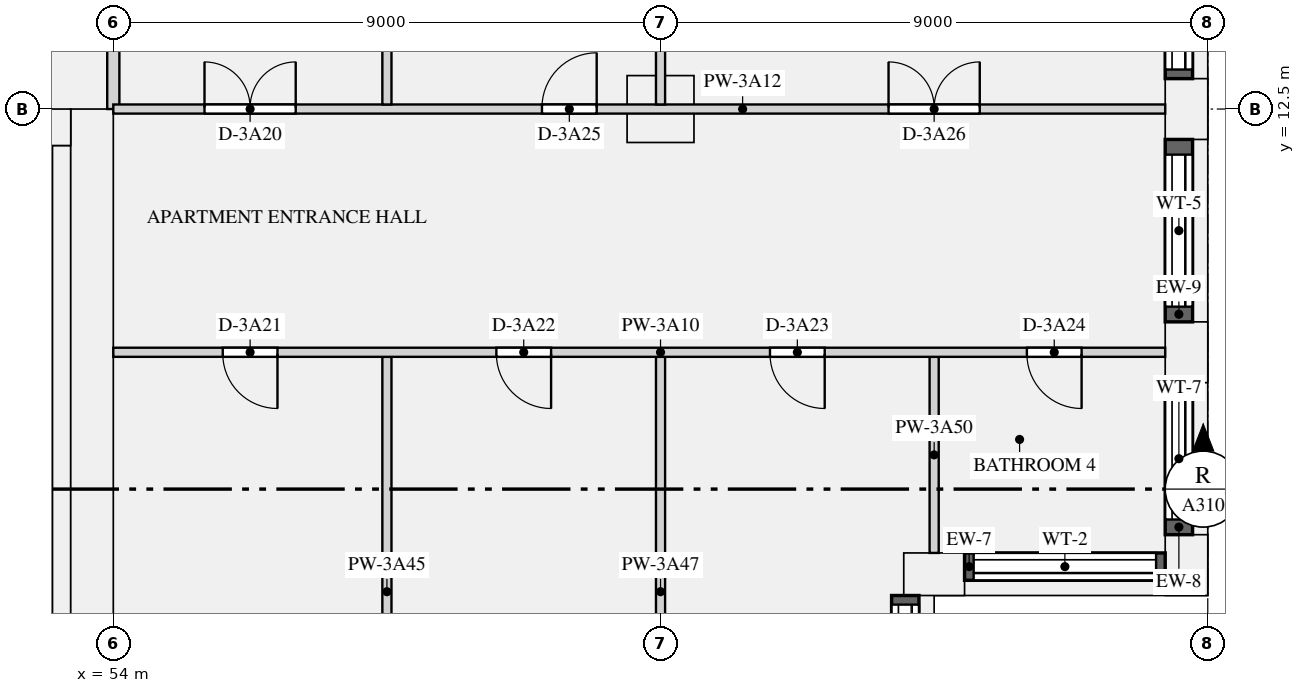
"""IFC4 building model, lengths in metres.
Left out: names, types, materials, properties, quantities, classifications, styles, units other than length and angle.
Written with IfcOpenShell. Run it as: python <this file> out.ifc"""

import sys

from ifc_helpers import new_model, si_unit, direction, frame, frame_2d, origin, origin_2d, place, context, subcontext, project, spatial, rectangle, extrude, element, fill, save


model = new_model("IFC4")
c1 = context("Model", 3, precision=1e-05, world=origin(), true_north=direction((0.0, 1.0)))
c2 = subcontext(c1, "Body", "Model", "MODEL_VIEW")
j1 = project(units=[si_unit("LENGTHUNIT", "METRE"), si_unit("PLANEANGLEUNIT", "RADIAN")], contexts=[c1])
p1 = place(None, origin())
s1 = spatial("IfcSite", under=j1, at=p1, CompositionType="ELEMENT")
p2 = place(p1, origin())
s2 = spatial("IfcBuilding", under=s1, at=p2, CompositionType="ELEMENT")
p3 = place(p2, frame((0.0, 0.0, 144.45)))
s3 = spatial("IfcBuildingStorey", under=s2, at=p3, CompositionType="ELEMENT", Elevation=144.45)
for number, where, z_axis, x_axis in (
    (1, (67.5, 4.85, 0.0), (0.0, 0.0, 1.0), (1.0, 0.0, 0.0)),
    (2, (71.65, 5.0, 0.0), (0.0, 0.0, 1.0), (0.0, 1.0, 0.0)),
    (3, (71.65, 8.5, 0.0), (0.0, 0.0, 1.0), (0.0, 1.0, 0.0)),
    (4, (71.65, 12.5, 0.0), (0.0, 0.0, 1.0), (0.0, 1.0, 0.0)),
):
    element("IfcColumn", number, at=place(p3, frame(where, z_axis=z_axis, x_axis=x_axis)), inside=s3, PredefinedType="USERDEFINED", context=c2, shape_type="SweptSolid", body=[
        extrude(rectangle(XDim=1.0, YDim=0.7, at=origin_2d()), origin(), (0.0, 0.0, 1.0), 3.15),
    ])
p4 = place(p3, frame((63.0, 12.5, 0.0), z_axis=(0.0, 0.0, 1.0), x_axis=(1.0, 0.0, 0.0)))
e5 = element("IfcColumn", 5, at=p4, inside=s3, PredefinedType="COLUMN", context=c2, shape_type="SweptSolid", body=[
    extrude(rectangle(XDim=1.1, YDim=1.1, at=origin_2d()), origin(), (0.0, 0.0, 1.0), 3.15),
])
p5 = place(p3, frame((53.65, 0.0, 0.0), z_axis=(0.0, 0.0, 1.0), x_axis=(0.0, 1.0, 0.0)))
e6 = element("IfcWall", 6, at=p5, inside=s3, PredefinedType="SHEAR", context=c2, shape_type="SweptSolid", body=[
    extrude(rectangle(XDim=12.5, YDim=0.7, at=frame_2d((6.25, 0.0))), origin(), (0.0, 0.0, 1.0), 3.15),
])
p6 = place(p3, frame((18.7, 12.2, 0.0), z_axis=(0.0, 0.0, 1.0), x_axis=(1.0, 0.0, 0.0)))
e7 = element("IfcWall", 7, at=p6, inside=s3, PredefinedType="SHEAR", context=c2, shape_type="SweptSolid", body=[
    extrude(rectangle(XDim=34.6, YDim=0.6, at=frame_2d((17.3, 0.0))), origin(), (0.0, 0.0, 1.0), 3.15),
])
p7 = place(p6, frame((24.475, 0.0, 0.0)))
e8 = element("IfcOpeningElement", 8, at=p7, cuts=e7, PredefinedType="OPENING", context=c2, shape_type="SweptSolid", body=[
    extrude(rectangle(XDim=1.1, YDim=2.1, at=frame_2d((0.55, 1.05))), frame((0.0, 0.31, 0.0), z_axis=(0.0, -1.0, 0.0), x_axis=(1.0, 0.0, 0.0)), (0.0, 0.0, 1.0), 0.62),
])
p8 = place(p6, frame((26.725, 0.0, 0.0)))
e9 = element("IfcOpeningElement", 9, at=p8, cuts=e7, PredefinedType="OPENING", context=c2, shape_type="SweptSolid", body=[
    extrude(rectangle(XDim=1.1, YDim=2.1, at=frame_2d((0.55, 1.05))), frame((0.0, 0.31, 0.0), z_axis=(0.0, -1.0, 0.0), x_axis=(1.0, 0.0, 0.0)), (0.0, 0.0, 1.0), 0.62),
])
p9 = place(p6, frame((28.975, 0.0, 0.0)))
e10 = element("IfcOpeningElement", 10, at=p9, cuts=e7, PredefinedType="OPENING", context=c2, shape_type="SweptSolid", body=[
    extrude(rectangle(XDim=1.1, YDim=2.1, at=frame_2d((0.55, 1.05))), frame((0.0, 0.31, 0.0), z_axis=(0.0, -1.0, 0.0), x_axis=(1.0, 0.0, 0.0)), (0.0, 0.0, 1.0), 0.62),
])
p10 = place(p6, frame((14.35, 0.0, 0.0)))
e11 = element("IfcOpeningElement", 11, at=p10, cuts=e7, PredefinedType="OPENING", context=c2, shape_type="SweptSolid", body=[
    extrude(rectangle(XDim=0.9, YDim=2.1, at=frame_2d((0.45, 1.05))), frame((0.0, 0.31, 0.0), z_axis=(0.0, -1.0, 0.0), x_axis=(1.0, 0.0, 0.0)), (0.0, 0.0, 1.0), 0.62),
])
p11 = place(p6, frame((1.45, 0.0, 0.0)))
e12 = element("IfcOpeningElement", 12, at=p11, cuts=e7, PredefinedType="OPENING", context=c2, shape_type="SweptSolid", body=[
    extrude(rectangle(XDim=1.2, YDim=2.1, at=frame_2d((0.6, 1.05))), frame((0.0, 0.31, 0.0), z_axis=(0.0, -1.0, 0.0), x_axis=(1.0, 0.0, 0.0)), (0.0, 0.0, 1.0), 0.62),
])
p12 = place(p6, frame((31.95, 0.0, 0.0)))
e13 = element("IfcOpeningElement", 13, at=p12, cuts=e7, PredefinedType="OPENING", context=c2, shape_type="SweptSolid", body=[
    extrude(rectangle(XDim=1.2, YDim=2.1, at=frame_2d((0.6, 1.05))), frame((0.0, 0.31, 0.0), z_axis=(0.0, -1.0, 0.0), x_axis=(1.0, 0.0, 0.0)), (0.0, 0.0, 1.0), 0.62),
])
p13 = place(p3, frame((53.15, 1.0, 0.0), z_axis=(0.0, 0.0, 1.0), x_axis=(0.0, 1.0, 0.0)))
e14 = element("IfcWall", 14, at=p13, inside=s3, PredefinedType="SHEAR", context=c2, shape_type="SweptSolid", body=[
    extrude(rectangle(XDim=10.9, YDim=0.3, at=frame_2d((5.45, 0.0))), origin(), (0.0, 0.0, 1.0), 3.15),
])
p14 = place(p3, frame((67.025, 1.0, 0.9), z_axis=(0.0, 0.0, 1.0), x_axis=(0.0, 1.0, 0.0)))
e15 = element("IfcWall", 15, at=p14, inside=s3, PredefinedType="SOLIDWALL", context=c2, shape_type="SweptSolid", body=[
    extrude(rectangle(XDim=3.5, YDim=0.45, at=frame_2d((1.75, 0.0))), origin(), (0.0, 0.0, 1.0), 1.93),
])
p15 = place(p14, frame((0.15, 0.0, 0.15)))
e16 = element("IfcOpeningElement", 16, at=p15, cuts=e15, PredefinedType="OPENING", context=c2, shape_type="SweptSolid", body=[
    extrude(rectangle(XDim=3.2, YDim=1.5, at=frame_2d((1.6, 0.75))), frame((0.0, 0.235, 0.0), z_axis=(0.0, -1.0, 0.0), x_axis=(1.0, 0.0, 0.0)), (0.0, 0.0, 1.0), 0.47),
])
p16 = place(p3, frame((68.0, 4.975, 0.9), z_axis=(0.0, 0.0, 1.0), x_axis=(1.0, 0.0, 0.0)))
e17 = element("IfcWall", 17, at=p16, inside=s3, PredefinedType="SOLIDWALL", context=c2, shape_type="SweptSolid", body=[
    extrude(rectangle(XDim=3.3, YDim=0.45, at=frame_2d((1.65, 0.0))), origin(), (0.0, 0.0, 1.0), 1.93),
])
p17 = place(p16, frame((0.15, 0.0, 0.15)))
e18 = element("IfcOpeningElement", 18, at=p17, cuts=e17, PredefinedType="OPENING", context=c2, shape_type="SweptSolid", body=[
    extrude(rectangle(XDim=3.0, YDim=1.5, at=frame_2d((1.5, 0.75))), frame((0.0, 0.235, 0.0), z_axis=(0.0, -1.0, 0.0), x_axis=(1.0, 0.0, 0.0)), (0.0, 0.0, 1.0), 0.47),
])
p18 = place(p3, frame((71.525, 5.5, 0.9), z_axis=(0.0, 0.0, 1.0), x_axis=(0.0, 1.0, 0.0)))
e19 = element("IfcWall", 19, at=p18, inside=s3, PredefinedType="SOLIDWALL", context=c2, shape_type="SweptSolid", body=[
    extrude(rectangle(XDim=2.5, YDim=0.45, at=frame_2d((1.25, 0.0))), origin(), (0.0, 0.0, 1.0), 1.93),
])
p19 = place(p18, frame((0.25, 0.0, 0.15)))
e20 = element("IfcOpeningElement", 20, at=p19, cuts=e19, PredefinedType="OPENING", context=c2, shape_type="SweptSolid", body=[
    extrude(rectangle(XDim=2.0, YDim=1.5, at=frame_2d((1.0, 0.75))), frame((0.0, 0.235, 0.0), z_axis=(0.0, -1.0, 0.0), x_axis=(1.0, 0.0, 0.0)), (0.0, 0.0, 1.0), 0.47),
])
p20 = place(p3, frame((71.525, 9.0, 0.9), z_axis=(0.0, 0.0, 1.0), x_axis=(0.0, 1.0, 0.0)))
e21 = element("IfcWall", 21, at=p20, inside=s3, PredefinedType="SOLIDWALL", context=c2, shape_type="SweptSolid", body=[
    extrude(rectangle(XDim=3.0, YDim=0.45, at=frame_2d((1.5, 0.0))), origin(), (0.0, 0.0, 1.0), 1.93),
])
p21 = place(p20, frame((0.25, 0.0, 0.15)))
e22 = element("IfcOpeningElement", 22, at=p21, cuts=e21, PredefinedType="OPENING", context=c2, shape_type="SweptSolid", body=[
    extrude(rectangle(XDim=2.5, YDim=1.5, at=frame_2d((1.25, 0.75))), frame((0.0, 0.235, 0.0), z_axis=(0.0, -1.0, 0.0), x_axis=(1.0, 0.0, 0.0)), (0.0, 0.0, 1.0), 0.47),
])
p22 = place(p3, frame((71.525, 13.0, 0.9), z_axis=(0.0, 0.0, 1.0), x_axis=(0.0, 1.0, 0.0)))
e23 = element("IfcWall", 23, at=p22, inside=s3, PredefinedType="SOLIDWALL", context=c2, shape_type="SweptSolid", body=[
    extrude(rectangle(XDim=2.8, YDim=0.45, at=frame_2d((1.4, 0.0))), origin(), (0.0, 0.0, 1.0), 1.93),
])
p23 = place(p22, frame((0.15, 0.0, 0.15)))
e24 = element("IfcOpeningElement", 24, at=p23, cuts=e23, PredefinedType="OPENING", context=c2, shape_type="SweptSolid", body=[
    extrude(rectangle(XDim=2.5, YDim=1.5, at=frame_2d((1.25, 0.75))), frame((0.0, 0.235, 0.0), z_axis=(0.0, -1.0, 0.0), x_axis=(1.0, 0.0, 0.0)), (0.0, 0.0, 1.0), 0.47),
])
p24 = place(p3, frame((54.0, 12.5, 0.0), z_axis=(0.0, 0.0, 1.0), x_axis=(0.0, 1.0, 0.0)))
e25 = element("IfcWall", 25, at=p24, inside=s3, PredefinedType="PARTITIONING", context=c2, shape_type="SweptSolid", body=[
    extrude(rectangle(XDim=3.4, YDim=0.2, at=frame_2d((1.7, 0.0))), origin(), (0.0, 0.0, 1.0), 2.83),
])
p25 = place(p3, frame((54.0, 8.5, 0.0), z_axis=(0.0, 0.0, 1.0), x_axis=(1.0, 0.0, 0.0)))
e26 = element("IfcWall", 26, at=p25, inside=s3, PredefinedType="PARTITIONING", context=c2, shape_type="SweptSolid", body=[
    extrude(rectangle(XDim=17.3, YDim=0.15, at=frame_2d((8.65, 0.0))), origin(), (0.0, 0.0, 1.0), 2.83),
])
p26 = place(p25, frame((1.8, 0.0, 0.0)))
e27 = element("IfcOpeningElement", 27, at=p26, cuts=e26, PredefinedType="OPENING", context=c2, shape_type="SweptSolid", body=[
    extrude(rectangle(XDim=0.9, YDim=2.1, at=frame_2d((0.45, 1.05))), frame((0.0, 0.085, 0.0), z_axis=(0.0, -1.0, 0.0), x_axis=(1.0, 0.0, 0.0)), (0.0, 0.0, 1.0), 0.17),
])
p27 = place(p25, frame((6.3, 0.0, 0.0)))
e28 = element("IfcOpeningElement", 28, at=p27, cuts=e26, PredefinedType="OPENING", context=c2, shape_type="SweptSolid", body=[
    extrude(rectangle(XDim=0.9, YDim=2.1, at=frame_2d((0.45, 1.05))), frame((0.0, 0.085, 0.0), z_axis=(0.0, -1.0, 0.0), x_axis=(1.0, 0.0, 0.0)), (0.0, 0.0, 1.0), 0.17),
])
p28 = place(p25, frame((10.8, 0.0, 0.0)))
e29 = element("IfcOpeningElement", 29, at=p28, cuts=e26, PredefinedType="OPENING", context=c2, shape_type="SweptSolid", body=[
    extrude(rectangle(XDim=0.9, YDim=2.1, at=frame_2d((0.45, 1.05))), frame((0.0, 0.085, 0.0), z_axis=(0.0, -1.0, 0.0), x_axis=(1.0, 0.0, 0.0)), (0.0, 0.0, 1.0), 0.17),
])
p29 = place(p25, frame((15.025, 0.0, 0.0)))
e30 = element("IfcOpeningElement", 30, at=p29, cuts=e26, PredefinedType="OPENING", context=c2, shape_type="SweptSolid", body=[
    extrude(rectangle(XDim=0.9, YDim=2.1, at=frame_2d((0.45, 1.05))), frame((0.0, 0.085, 0.0), z_axis=(0.0, -1.0, 0.0), x_axis=(1.0, 0.0, 0.0)), (0.0, 0.0, 1.0), 0.17),
])
p30 = place(p3, frame((54.0, 12.5, 0.0), z_axis=(0.0, 0.0, 1.0), x_axis=(1.0, 0.0, 0.0)))
e31 = element("IfcWall", 31, at=p30, inside=s3, PredefinedType="PARTITIONING", context=c2, shape_type="SweptSolid", body=[
    extrude(rectangle(XDim=17.3, YDim=0.15, at=frame_2d((8.65, 0.0))), origin(), (0.0, 0.0, 1.0), 2.83),
])
p31 = place(p30, frame((1.5, 0.0, 0.0)))
e32 = element("IfcOpeningElement", 32, at=p31, cuts=e31, PredefinedType="OPENING", context=c2, shape_type="SweptSolid", body=[
    extrude(rectangle(XDim=1.5, YDim=2.1, at=frame_2d((0.75, 1.05))), frame((0.0, 0.085, 0.0), z_axis=(0.0, -1.0, 0.0), x_axis=(1.0, 0.0, 0.0)), (0.0, 0.0, 1.0), 0.17),
])
p32 = place(p30, frame((7.05, 0.0, 0.0)))
e33 = element("IfcOpeningElement", 33, at=p32, cuts=e31, PredefinedType="OPENING", context=c2, shape_type="SweptSolid", body=[
    extrude(rectangle(XDim=0.9, YDim=2.1, at=frame_2d((0.45, 1.05))), frame((0.0, 0.085, 0.0), z_axis=(0.0, -1.0, 0.0), x_axis=(1.0, 0.0, 0.0)), (0.0, 0.0, 1.0), 0.17),
])
p33 = place(p30, frame((12.75, 0.0, 0.0)))
e34 = element("IfcOpeningElement", 34, at=p33, cuts=e31, PredefinedType="OPENING", context=c2, shape_type="SweptSolid", body=[
    extrude(rectangle(XDim=1.5, YDim=2.1, at=frame_2d((0.75, 1.05))), frame((0.0, 0.085, 0.0), z_axis=(0.0, -1.0, 0.0), x_axis=(1.0, 0.0, 0.0)), (0.0, 0.0, 1.0), 0.17),
])
p34 = place(p3, frame((58.5, 0.7, 0.0), z_axis=(0.0, 0.0, 1.0), x_axis=(0.0, 1.0, 0.0)))
e35 = element("IfcWall", 35, at=p34, inside=s3, PredefinedType="PARTITIONING", context=c2, shape_type="SweptSolid", body=[
    extrude(rectangle(XDim=7.725, YDim=0.15, at=frame_2d((3.863, 0.0))), origin(), (0.0, 0.0, 1.0), 2.83),
])
p35 = place(p3, frame((58.5, 12.575, 0.0), z_axis=(0.0, 0.0, 1.0), x_axis=(0.0, 1.0, 0.0)))
e36 = element("IfcWall", 36, at=p35, inside=s3, PredefinedType="PARTITIONING", context=c2, shape_type="SweptSolid", body=[
    extrude(rectangle(XDim=10.325, YDim=0.15, at=frame_2d((5.163, 0.0))), origin(), (0.0, 0.0, 1.0), 2.83),
])
p36 = place(p35, frame((6.75, 0.0, 0.0)))
e37 = element("IfcOpeningElement", 37, at=p36, cuts=e36, PredefinedType="OPENING", context=c2, shape_type="SweptSolid", body=[
    extrude(rectangle(XDim=0.9, YDim=2.1, at=frame_2d((0.45, 1.05))), frame((0.0, 0.085, 0.0), z_axis=(0.0, -1.0, 0.0), x_axis=(1.0, 0.0, 0.0)), (0.0, 0.0, 1.0), 0.17),
])
p37 = place(p3, frame((63.0, 0.7, 0.0), z_axis=(0.0, 0.0, 1.0), x_axis=(0.0, 1.0, 0.0)))
e38 = element("IfcWall", 38, at=p37, inside=s3, PredefinedType="PARTITIONING", context=c2, shape_type="SweptSolid", body=[
    extrude(rectangle(XDim=7.725, YDim=0.15, at=frame_2d((3.863, 0.0))), origin(), (0.0, 0.0, 1.0), 2.83),
])
p38 = place(p3, frame((63.0, 12.575, 0.0), z_axis=(0.0, 0.0, 1.0), x_axis=(0.0, 1.0, 0.0)))
e39 = element("IfcWall", 39, at=p38, inside=s3, PredefinedType="PARTITIONING", context=c2, shape_type="SweptSolid", body=[
    extrude(rectangle(XDim=15.85, YDim=0.15, at=frame_2d((7.925, 0.0))), origin(), (0.0, 0.0, 1.0), 2.83),
])
p39 = place(p38, frame((5.475, 0.0, 0.0)))
e40 = element("IfcOpeningElement", 40, at=p39, cuts=e39, PredefinedType="OPENING", context=c2, shape_type="SweptSolid", body=[
    extrude(rectangle(XDim=0.9, YDim=2.1, at=frame_2d((0.45, 1.05))), frame((0.0, 0.085, 0.0), z_axis=(0.0, -1.0, 0.0), x_axis=(1.0, 0.0, 0.0)), (0.0, 0.0, 1.0), 0.17),
])
p40 = place(p3, frame((67.5, 5.2, 0.0), z_axis=(0.0, 0.0, 1.0), x_axis=(0.0, 1.0, 0.0)))
e41 = element("IfcWall", 41, at=p40, inside=s3, PredefinedType="PARTITIONING", context=c2, shape_type="SweptSolid", body=[
    extrude(rectangle(XDim=3.225, YDim=0.15, at=frame_2d((1.613, 0.0))), origin(), (0.0, 0.0, 1.0), 2.83),
])
p41 = place(p15, origin())
e42 = element("IfcWindow", 42, at=p41, inside=s3, PartitioningType="SINGLE_PANEL", PredefinedType="WINDOW", context=c2, shape_type="SweptSolid", body=[
    extrude(rectangle(XDim=3.2, YDim=1.5, at=frame_2d((1.6, 0.75))), frame((0.0, -0.065, 0.0), z_axis=(0.0, -1.0, 0.0), x_axis=(1.0, 0.0, 0.0)), (0.0, 0.0, 1.0), 0.06),
])
fill(e16, e42)
p42 = place(p17, origin())
e43 = element("IfcWindow", 43, at=p42, inside=s3, PartitioningType="SINGLE_PANEL", PredefinedType="WINDOW", context=c2, shape_type="SweptSolid", body=[
    extrude(rectangle(XDim=3.0, YDim=1.5, at=frame_2d((1.5, 0.75))), frame((0.0, -0.065, 0.0), z_axis=(0.0, -1.0, 0.0), x_axis=(1.0, 0.0, 0.0)), (0.0, 0.0, 1.0), 0.06),
])
fill(e18, e43)
p43 = place(p19, origin())
e44 = element("IfcWindow", 44, at=p43, inside=s3, PartitioningType="SINGLE_PANEL", PredefinedType="WINDOW", context=c2, shape_type="SweptSolid", body=[
    extrude(rectangle(XDim=2.0, YDim=1.5, at=frame_2d((1.0, 0.75))), frame((0.0, -0.065, 0.0), z_axis=(0.0, -1.0, 0.0), x_axis=(1.0, 0.0, 0.0)), (0.0, 0.0, 1.0), 0.06),
])
fill(e20, e44)
p44 = place(p21, origin())
e45 = element("IfcWindow", 45, at=p44, inside=s3, PartitioningType="SINGLE_PANEL", PredefinedType="WINDOW", context=c2, shape_type="SweptSolid", body=[
    extrude(rectangle(XDim=2.5, YDim=1.5, at=frame_2d((1.25, 0.75))), frame((0.0, -0.065, 0.0), z_axis=(0.0, -1.0, 0.0), x_axis=(1.0, 0.0, 0.0)), (0.0, 0.0, 1.0), 0.06),
])
fill(e22, e45)
p45 = place(p23, origin())
e46 = element("IfcWindow", 46, at=p45, inside=s3, PartitioningType="SINGLE_PANEL", PredefinedType="WINDOW", context=c2, shape_type="SweptSolid", body=[
    extrude(rectangle(XDim=2.5, YDim=1.5, at=frame_2d((1.25, 0.75))), frame((0.0, -0.065, 0.0), z_axis=(0.0, -1.0, 0.0), x_axis=(1.0, 0.0, 0.0)), (0.0, 0.0, 1.0), 0.06),
])
fill(e24, e46)
p46 = place(p31, origin())
e47 = element("IfcDoor", 47, at=p46, inside=s3, OperationType="DOUBLE_DOOR_SINGLE_SWING", PredefinedType="DOOR", context=c2, shape_type="SweptSolid", body=[
    extrude(rectangle(XDim=1.5, YDim=2.1, at=frame_2d((0.75, 1.05))), frame((0.0, 0.025, 0.0), z_axis=(0.0, -1.0, 0.0), x_axis=(1.0, 0.0, 0.0)), (0.0, 0.0, 1.0), 0.05),
])
fill(e32, e47)
p47 = place(p26, frame((0.9, 0.0, 0.0), z_axis=(0.0, 0.0, 1.0), x_axis=(-1.0, 0.0, 0.0)))
e48 = element("IfcDoor", 48, at=p47, inside=s3, OperationType="SINGLE_SWING_LEFT", PredefinedType="DOOR", context=c2, shape_type="SweptSolid", body=[
    extrude(rectangle(XDim=0.9, YDim=2.1, at=frame_2d((0.45, 1.05))), frame((0.0, 0.025, 0.0), z_axis=(0.0, -1.0, 0.0), x_axis=(1.0, 0.0, 0.0)), (0.0, 0.0, 1.0), 0.05),
])
fill(e27, e48)
p48 = place(p27, frame((0.9, 0.0, 0.0), z_axis=(0.0, 0.0, 1.0), x_axis=(-1.0, 0.0, 0.0)))
e49 = element("IfcDoor", 49, at=p48, inside=s3, OperationType="SINGLE_SWING_LEFT", PredefinedType="DOOR", context=c2, shape_type="SweptSolid", body=[
    extrude(rectangle(XDim=0.9, YDim=2.1, at=frame_2d((0.45, 1.05))), frame((0.0, 0.025, 0.0), z_axis=(0.0, -1.0, 0.0), x_axis=(1.0, 0.0, 0.0)), (0.0, 0.0, 1.0), 0.05),
])
fill(e28, e49)
p49 = place(p28, frame((0.9, 0.0, 0.0), z_axis=(0.0, 0.0, 1.0), x_axis=(-1.0, 0.0, 0.0)))
e50 = element("IfcDoor", 50, at=p49, inside=s3, OperationType="SINGLE_SWING_LEFT", PredefinedType="DOOR", context=c2, shape_type="SweptSolid", body=[
    extrude(rectangle(XDim=0.9, YDim=2.1, at=frame_2d((0.45, 1.05))), frame((0.0, 0.025, 0.0), z_axis=(0.0, -1.0, 0.0), x_axis=(1.0, 0.0, 0.0)), (0.0, 0.0, 1.0), 0.05),
])
fill(e29, e50)
p50 = place(p29, frame((0.9, 0.0, 0.0), z_axis=(0.0, 0.0, 1.0), x_axis=(-1.0, 0.0, 0.0)))
e51 = element("IfcDoor", 51, at=p50, inside=s3, OperationType="SINGLE_SWING_LEFT", PredefinedType="DOOR", context=c2, shape_type="SweptSolid", body=[
    extrude(rectangle(XDim=0.9, YDim=2.1, at=frame_2d((0.45, 1.05))), frame((0.0, 0.025, 0.0), z_axis=(0.0, -1.0, 0.0), x_axis=(1.0, 0.0, 0.0)), (0.0, 0.0, 1.0), 0.05),
])
fill(e30, e51)
p51 = place(p32, origin())
e52 = element("IfcDoor", 52, at=p51, inside=s3, OperationType="SINGLE_SWING_RIGHT", PredefinedType="DOOR", context=c2, shape_type="SweptSolid", body=[
    extrude(rectangle(XDim=0.9, YDim=2.1, at=frame_2d((0.45, 1.05))), frame((0.0, 0.025, 0.0), z_axis=(0.0, -1.0, 0.0), x_axis=(1.0, 0.0, 0.0)), (0.0, 0.0, 1.0), 0.05),
])
fill(e33, e52)
p52 = place(p33, origin())
e53 = element("IfcDoor", 53, at=p52, inside=s3, OperationType="DOUBLE_DOOR_SINGLE_SWING", PredefinedType="DOOR", context=c2, shape_type="SweptSolid", body=[
    extrude(rectangle(XDim=1.5, YDim=2.1, at=frame_2d((0.75, 1.05))), frame((0.0, 0.025, 0.0), z_axis=(0.0, -1.0, 0.0), x_axis=(1.0, 0.0, 0.0)), (0.0, 0.0, 1.0), 0.05),
])
fill(e34, e53)
save(model, sys.argv[1])
